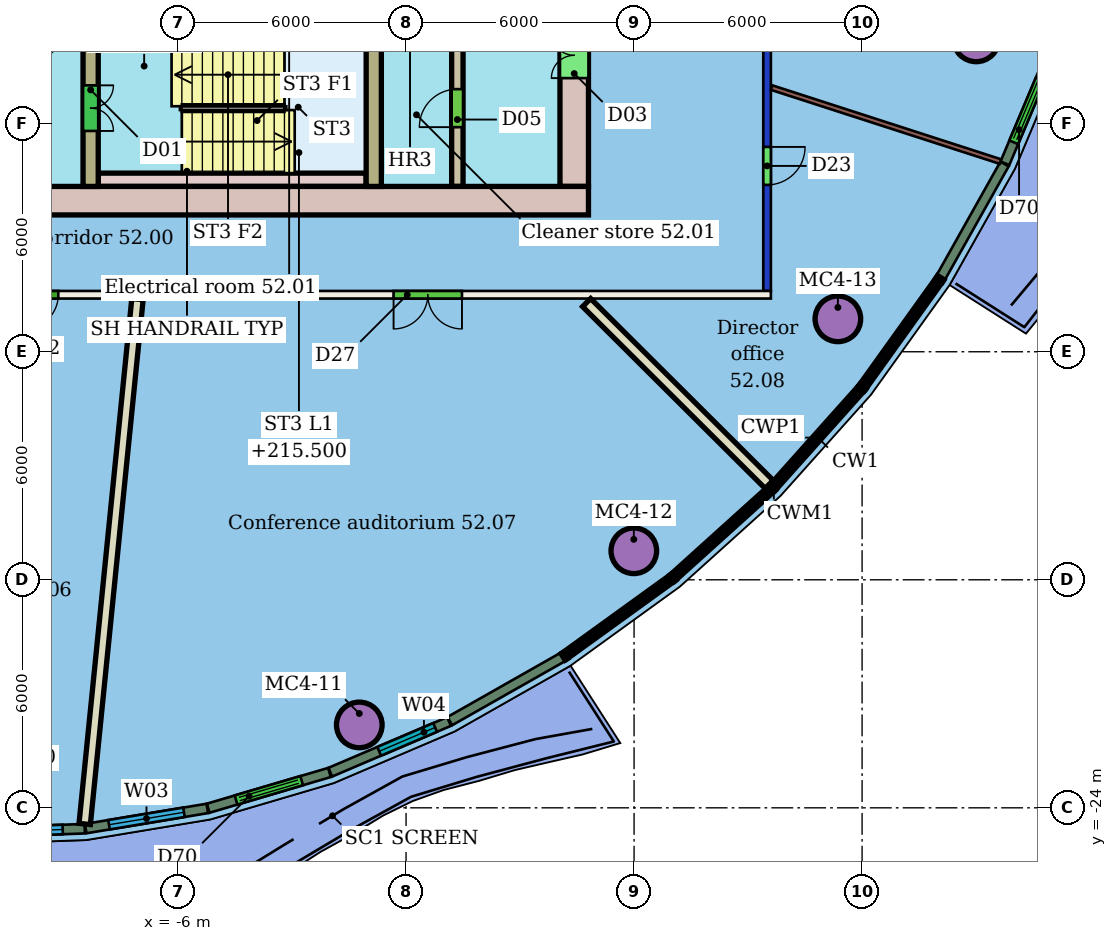
"""IFC4 building model, lengths in metres.
Left out: names, types, materials, properties, quantities, classifications, styles, units other than length and angle.
Written with IfcOpenShell. Run it as: python <this file> out.ifc"""

import sys

from ifc_helpers import new_model, si_unit, direction, frame, frame_2d, origin, origin_2d, place, context, subcontext, project, spatial, rectangle, hollow_circle, extrude, element, fill, save


model = new_model("IFC4")
c1 = context("Model", 3, precision=1e-05, world=origin(), true_north=direction((0.0, 1.0)))
c2 = subcontext(c1, "Body", "Model", "MODEL_VIEW")
j1 = project(units=[si_unit("LENGTHUNIT", "METRE"), si_unit("PLANEANGLEUNIT", "RADIAN")], contexts=[c1])
p1 = place(None, origin())
s1 = spatial("IfcSite", under=j1, at=p1, CompositionType="ELEMENT")
p2 = place(p1, origin())
s2 = spatial("IfcBuilding", under=s1, at=p2, CompositionType="ELEMENT")
p3 = place(p2, frame((0.0, 0.0, 213.7)))
s3 = spatial("IfcBuildingStorey", under=s2, at=p3, CompositionType="ELEMENT", Elevation=213.7)
for number, where, z_axis, x_axis in (
    (1, (-1.231, -21.819, 0.0), (0.0, 0.0, 1.0), (1.0, 0.0, 0.0)),
    (2, (5.993, -17.237, 0.0), (0.0, 0.0, 1.0), (1.0, 0.0, 0.0)),
    (3, (11.363, -11.134, 0.0), (0.0, 0.0, 1.0), (1.0, 0.0, 0.0)),
    (4, (15.003, -3.768, 0.0), (0.0, 0.0, 1.0), (1.0, 0.0, 0.0)),
):
    element("IfcColumn", number, at=place(p3, frame(where, z_axis=z_axis, x_axis=x_axis)), inside=s3, PredefinedType="COLUMN", context=c2, shape_type="SweptSolid", body=[
        extrude(hollow_circle(Radius=0.6, WallThickness=0.045, at=origin_2d()), origin(), (0.0, 0.0, 1.0), 3.45),
    ])
p4 = place(p3, frame((9.6, -10.5, 0.0), z_axis=(0.0, 0.0, 1.0), x_axis=(-1.0, 0.0, 0.0)))
e5 = element("IfcWall", 5, at=p4, inside=s3, PredefinedType="PARTITIONING", context=c2, shape_type="SweptSolid", body=[
    extrude(rectangle(XDim=31.2, YDim=0.2, at=frame_2d((15.6, 0.0))), origin(), (0.0, 0.0, 1.0), 3.45),
])
p5 = place(p4, frame((21.715, 0.0, 0.0)))
e6 = element("IfcOpeningElement", 6, at=p5, cuts=e5, PredefinedType="OPENING", context=c2, shape_type="SweptSolid", body=[
    extrude(rectangle(XDim=0.9, YDim=2.1, at=frame_2d((0.45, 1.05))), frame((0.0, 0.11, 0.0), z_axis=(0.0, -1.0, 0.0), x_axis=(1.0, 0.0, 0.0)), (0.0, 0.0, 1.0), 0.22),
])
p6 = place(p4, frame((18.751, 0.0, 0.0)))
e7 = element("IfcOpeningElement", 7, at=p6, cuts=e5, PredefinedType="OPENING", context=c2, shape_type="SweptSolid", body=[
    extrude(rectangle(XDim=0.9, YDim=2.1, at=frame_2d((0.45, 1.05))), frame((0.0, 0.11, 0.0), z_axis=(0.0, -1.0, 0.0), x_axis=(1.0, 0.0, 0.0)), (0.0, 0.0, 1.0), 0.22),
])
p7 = place(p4, frame((8.129, 0.0, 0.0)))
e8 = element("IfcOpeningElement", 8, at=p7, cuts=e5, PredefinedType="OPENING", context=c2, shape_type="SweptSolid", body=[
    extrude(rectangle(XDim=1.8, YDim=2.4, at=frame_2d((0.9, 1.2))), frame((0.0, 0.11, 0.0), z_axis=(0.0, -1.0, 0.0), x_axis=(1.0, 0.0, 0.0)), (0.0, 0.0, 1.0), 0.22),
])
p8 = place(p3, frame((9.5, 10.4, 0.0), z_axis=(0.0, 0.0, 1.0), x_axis=(0.0, -1.0, 0.0)))
e9 = element("IfcWall", 9, at=p8, inside=s3, PredefinedType="PARTITIONING", context=c2, shape_type="SweptSolid", body=[
    extrude(rectangle(XDim=20.8, YDim=0.2, at=frame_2d((10.4, 0.0))), origin(), (0.0, 0.0, 1.0), 3.05),
])
p9 = place(p8, frame((17.01, 0.0, 0.0)))
e10 = element("IfcOpeningElement", 10, at=p9, cuts=e9, PredefinedType="OPENING", context=c2, shape_type="SweptSolid", body=[
    extrude(rectangle(XDim=1.0, YDim=2.4, at=frame_2d((0.5, 1.2))), frame((0.0, 0.11, 0.0), z_axis=(0.0, -1.0, 0.0), x_axis=(1.0, 0.0, 0.0)), (0.0, 0.0, 1.0), 0.22),
])
p10 = place(p8, frame((11.015, 0.0, 0.0)))
e11 = element("IfcOpeningElement", 11, at=p10, cuts=e9, PredefinedType="OPENING", context=c2, shape_type="SweptSolid", body=[
    extrude(rectangle(XDim=1.5, YDim=2.1, at=frame_2d((0.75, 1.05))), frame((0.0, 0.11, 0.0), z_axis=(0.0, -1.0, 0.0), x_axis=(1.0, 0.0, 0.0)), (0.0, 0.0, 1.0), 0.22),
])
p11 = place(p3, frame((-8.456, -24.425, 0.0), z_axis=(0.0, 0.0, 1.0), x_axis=(0.100052305019, 0.994982178866, 0.0)))
e12 = element("IfcWall", 12, at=p11, inside=s3, PredefinedType="PARTITIONING", context=c2, shape_type="SweptSolid", body=[
    extrude(rectangle(XDim=13.879, YDim=0.3, at=frame_2d((6.94, 0.0))), origin(), (0.0, 0.0, 1.0), 3.45),
])
p12 = place(p3, frame((9.555, -15.49, 0.0), z_axis=(0.0, 0.0, 1.0), x_axis=(-0.708581751717, 0.705628727543, 0.0)))
e13 = element("IfcWall", 13, at=p12, inside=s3, PredefinedType="PARTITIONING", context=c2, shape_type="SweptSolid", body=[
    extrude(rectangle(XDim=6.779, YDim=0.3, at=frame_2d((3.39, 0.0))), origin(), (0.0, 0.0, 1.0), 3.45),
])
p13 = place(p3, frame((15.642, -6.996, 0.0), z_axis=(0.0, 0.0, 1.0), x_axis=(-0.951521574536, 0.307582010514, 0.0)))
e14 = element("IfcWall", 14, at=p13, inside=s3, PredefinedType="PARTITIONING", context=c2, shape_type="SweptSolid", body=[
    extrude(rectangle(XDim=6.329, YDim=0.125, at=frame_2d((3.165, 0.0))), origin(), (0.0, 0.0, 1.0), 3.45),
])
p14 = place(p3, frame((-11.613, -24.663, 0.0), z_axis=(0.0, 0.0, 1.0), x_axis=(0.999351383862, 0.036011270096, 0.0)))
e15 = element("IfcWall", 15, at=p14, inside=s3, PredefinedType="SOLIDWALL", context=c2, shape_type="SweptSolid", body=[
    extrude(rectangle(XDim=3.159, YDim=0.25, at=frame_2d((1.58, 0.0))), origin(), (0.0, 0.0, 1.0), 3.1),
])
p15 = place(p14, frame((0.58, 0.0, 0.9)))
e16 = element("IfcOpeningElement", 16, at=p15, cuts=e15, PredefinedType="OPENING", context=c2, shape_type="SweptSolid", body=[
    extrude(rectangle(XDim=2.0, YDim=2.1, at=frame_2d((1.0, 1.05))), frame((0.0, 0.135, 0.0), z_axis=(0.0, -1.0, 0.0), x_axis=(1.0, 0.0, 0.0)), (0.0, 0.0, 1.0), 0.27),
])
p16 = place(p3, frame((-8.432, -24.547, 0.0), z_axis=(0.0, 0.0, 1.0), x_axis=(0.986515622096, 0.163667123641, 0.0)))
e17 = element("IfcWall", 17, at=p16, inside=s3, PredefinedType="SOLIDWALL", context=c2, shape_type="SweptSolid", body=[
    extrude(rectangle(XDim=3.246, YDim=0.25, at=frame_2d((1.623, 0.0))), origin(), (0.0, 0.0, 1.0), 3.1),
])
p17 = place(p16, frame((0.623, 0.0, 0.9)))
e18 = element("IfcOpeningElement", 18, at=p17, cuts=e17, PredefinedType="OPENING", context=c2, shape_type="SweptSolid", body=[
    extrude(rectangle(XDim=2.0, YDim=2.1, at=frame_2d((1.0, 1.05))), frame((0.0, 0.135, 0.0), z_axis=(0.0, -1.0, 0.0), x_axis=(1.0, 0.0, 0.0)), (0.0, 0.0, 1.0), 0.27),
])
p18 = place(p3, frame((-5.207, -24.011, 0.0), z_axis=(0.0, 0.0, 1.0), x_axis=(0.959226347216, 0.282639018548, 0.0)))
e19 = element("IfcWall", 19, at=p18, inside=s3, PredefinedType="SOLIDWALL", context=c2, shape_type="SweptSolid", body=[
    extrude(rectangle(XDim=3.327, YDim=0.25, at=frame_2d((1.664, 0.0))), origin(), (0.0, 0.0, 1.0), 3.1),
])
p19 = place(p18, frame((0.764, 0.0, 0.0)))
e20 = element("IfcOpeningElement", 20, at=p19, cuts=e19, PredefinedType="OPENING", context=c2, shape_type="SweptSolid", body=[
    extrude(rectangle(XDim=1.8, YDim=2.4, at=frame_2d((0.9, 1.2))), frame((0.0, 0.135, 0.0), z_axis=(0.0, -1.0, 0.0), x_axis=(1.0, 0.0, 0.0)), (0.0, 0.0, 1.0), 0.27),
])
p20 = place(p3, frame((-1.994, -23.063, 0.0), z_axis=(0.0, 0.0, 1.0), x_axis=(0.919690332373, 0.392644486195, 0.0)))
e21 = element("IfcWall", 21, at=p20, inside=s3, PredefinedType="SOLIDWALL", context=c2, shape_type="SweptSolid", body=[
    extrude(rectangle(XDim=3.399, YDim=0.25, at=frame_2d((1.699, 0.0))), origin(), (0.0, 0.0, 1.0), 3.1),
])
p21 = place(p20, frame((1.399, 0.0, 0.9)))
e22 = element("IfcOpeningElement", 22, at=p21, cuts=e21, PredefinedType="OPENING", context=c2, shape_type="SweptSolid", body=[
    extrude(rectangle(XDim=1.6, YDim=2.1, at=frame_2d((0.8, 1.05))), frame((0.0, 0.135, 0.0), z_axis=(0.0, -1.0, 0.0), x_axis=(1.0, 0.0, 0.0)), (0.0, 0.0, 1.0), 0.27),
])
for number, where, z_axis, x_axis in (
    (23, (1.152, -21.719, 0.0), (0.0, 0.0, 1.0), (0.87, 0.494, 0.0)),
    (24, (14.077, -10.035, 0.0), (0.0, 0.0, 1.0), (0.49, 0.872, 0.0)),
):
    element("IfcWall", number, at=place(p3, frame(where, z_axis=z_axis, x_axis=x_axis)), inside=s3, PredefinedType="SOLIDWALL", context=c2, shape_type="SweptSolid", body=[
        extrude(rectangle(XDim=3.412, YDim=0.25, at=frame_2d((1.706, 0.0))), origin(), (0.0, 0.0, 1.0), 3.1),
    ])
p22 = place(p3, frame((15.758, -7.041, 0.0), z_axis=(0.0, 0.0, 1.0), x_axis=(0.388763390527, 0.921337628769, 0.0)))
e25 = element("IfcWall", 25, at=p22, inside=s3, PredefinedType="SOLIDWALL", context=c2, shape_type="SweptSolid", body=[
    extrude(rectangle(XDim=3.399, YDim=0.25, at=frame_2d((1.699, 0.0))), origin(), (0.0, 0.0, 1.0), 3.1),
])
p23 = place(p22, frame((0.599, 0.0, 0.0)))
e26 = element("IfcOpeningElement", 26, at=p23, cuts=e25, PredefinedType="OPENING", context=c2, shape_type="SweptSolid", body=[
    extrude(rectangle(XDim=1.8, YDim=2.4, at=frame_2d((0.9, 1.2))), frame((0.0, 0.135, 0.0), z_axis=(0.0, -1.0, 0.0), x_axis=(1.0, 0.0, 0.0)), (0.0, 0.0, 1.0), 0.27),
])
p24 = place(p3, frame((-16.8, -8.025, 0.0), z_axis=(0.0, 0.0, 1.0), x_axis=(1.0, 0.0, 0.0)))
e27 = element("IfcWall", 27, at=p24, inside=s3, PredefinedType="SHEAR", context=c2, shape_type="SweptSolid", body=[
    extrude(rectangle(XDim=21.6, YDim=0.75, at=frame_2d((10.8, 0.0))), origin(), (0.0, 0.0, 1.0), 3.3),
])
p25 = place(p24, frame((4.8, 0.0, 0.0)))
e28 = element("IfcOpeningElement", 28, at=p25, cuts=e27, PredefinedType="OPENING", context=c2, shape_type="SweptSolid", body=[
    extrude(rectangle(XDim=1.2, YDim=2.1, at=frame_2d((0.6, 1.05))), frame((0.0, 0.385, 0.0), z_axis=(0.0, -1.0, 0.0), x_axis=(1.0, 0.0, 0.0)), (0.0, 0.0, 1.0), 0.77),
])
p26 = place(p3, frame((4.425, -7.65, 0.0), z_axis=(0.0, 0.0, 1.0), x_axis=(0.0, 1.0, 0.0)))
e29 = element("IfcWall", 29, at=p26, inside=s3, PredefinedType="SHEAR", context=c2, shape_type="SweptSolid", body=[
    extrude(rectangle(XDim=15.3, YDim=0.75, at=frame_2d((7.65, 0.0))), origin(), (0.0, 0.0, 1.0), 3.3),
])
p27 = place(p26, frame((2.85, 0.0, 0.0)))
e30 = element("IfcOpeningElement", 30, at=p27, cuts=e29, PredefinedType="OPENING", context=c2, shape_type="SweptSolid", body=[
    extrude(rectangle(XDim=1.2, YDim=2.1, at=frame_2d((0.6, 1.05))), frame((0.0, 0.385, 0.0), z_axis=(0.0, -1.0, 0.0), x_axis=(1.0, 0.0, 0.0)), (0.0, 0.0, 1.0), 0.77),
])
p28 = place(p26, frame((11.25, 0.0, 0.0)))
e31 = element("IfcOpeningElement", 31, at=p28, cuts=e29, PredefinedType="OPENING", context=c2, shape_type="SweptSolid", body=[
    extrude(rectangle(XDim=1.2, YDim=2.1, at=frame_2d((0.6, 1.05))), frame((0.0, 0.385, 0.0), z_axis=(0.0, -1.0, 0.0), x_axis=(1.0, 0.0, 0.0)), (0.0, 0.0, 1.0), 0.77),
])
p29 = place(p3, frame((1.35, -7.65, 0.0), z_axis=(0.0, 0.0, 1.0), x_axis=(0.0, 1.0, 0.0)))
e32 = element("IfcWall", 32, at=p29, inside=s3, PredefinedType="SHEAR", context=c2, shape_type="SweptSolid", body=[
    extrude(rectangle(XDim=15.3, YDim=0.3, at=frame_2d((7.65, 0.0))), origin(), (0.0, 0.0, 1.0), 3.3),
])
p30 = place(p29, frame((1.56, 0.0, 0.0)))
e33 = element("IfcOpeningElement", 33, at=p30, cuts=e32, PredefinedType="OPENING", context=c2, shape_type="SweptSolid", body=[
    extrude(rectangle(XDim=1.0, YDim=2.1, at=frame_2d((0.5, 1.05))), frame((0.0, 0.16, 0.0), z_axis=(0.0, -1.0, 0.0), x_axis=(1.0, 0.0, 0.0)), (0.0, 0.0, 1.0), 0.32),
])
p31 = place(p29, frame((6.9, 0.0, 0.0)))
e34 = element("IfcOpeningElement", 34, at=p31, cuts=e32, PredefinedType="OPENING", context=c2, shape_type="SweptSolid", body=[
    extrude(rectangle(XDim=1.5, YDim=2.1, at=frame_2d((0.75, 1.05))), frame((0.0, 0.16, 0.0), z_axis=(0.0, -1.0, 0.0), x_axis=(1.0, 0.0, 0.0)), (0.0, 0.0, 1.0), 0.32),
])
p32 = place(p3, frame((-8.3, -3.88, 0.0), z_axis=(0.0, 0.0, 1.0), x_axis=(0.0, -1.0, 0.0)))
e35 = element("IfcWall", 35, at=p32, inside=s3, PredefinedType="SHEAR", context=c2, shape_type="SweptSolid", body=[
    extrude(rectangle(XDim=3.77, YDim=0.4, at=frame_2d((1.885, 0.0))), origin(), (0.0, 0.0, 1.0), 3.3),
])
p33 = place(p32, frame((1.11, 0.0, 0.0)))
e36 = element("IfcOpeningElement", 36, at=p33, cuts=e35, PredefinedType="OPENING", context=c2, shape_type="SweptSolid", body=[
    extrude(rectangle(XDim=1.2, YDim=2.1, at=frame_2d((0.6, 1.05))), frame((0.0, 0.21, 0.0), z_axis=(0.0, -1.0, 0.0), x_axis=(1.0, 0.0, 0.0)), (0.0, 0.0, 1.0), 0.42),
])
p34 = place(p3, frame((-0.85, -3.88, 0.0), z_axis=(0.0, 0.0, 1.0), x_axis=(0.0, -1.0, 0.0)))
e37 = element("IfcWall", 37, at=p34, inside=s3, PredefinedType="SHEAR", context=c2, shape_type="SweptSolid", body=[
    extrude(rectangle(XDim=3.77, YDim=0.4, at=frame_2d((1.885, 0.0))), origin(), (0.0, 0.0, 1.0), 3.3),
])
p35 = place(p3, frame((-8.1, -7.475, 0.0), z_axis=(0.0, 0.0, 1.0), x_axis=(1.0, 0.0, 0.0)))
e38 = element("IfcWall", 38, at=p35, inside=s3, PredefinedType="SHEAR", context=c2, shape_type="SweptSolid", body=[
    extrude(rectangle(XDim=7.05, YDim=0.35, at=frame_2d((3.525, 0.0))), origin(), (0.0, 0.0, 1.0), 3.3),
])
p36 = place(p6, origin())
e39 = element("IfcDoor", 39, at=p36, inside=s3, OperationType="SINGLE_SWING_RIGHT", PredefinedType="DOOR", context=c2, shape_type="SweptSolid", body=[
    extrude(rectangle(XDim=0.9, YDim=2.1, at=frame_2d((0.45, 1.05))), frame((0.0, 0.025, 0.0), z_axis=(0.0, -1.0, 0.0), x_axis=(1.0, 0.0, 0.0)), (0.0, 0.0, 1.0), 0.05),
])
fill(e7, e39)
p37 = place(p7, origin())
e40 = element("IfcDoor", 40, at=p37, inside=s3, OperationType="DOUBLE_DOOR_SINGLE_SWING", PredefinedType="DOOR", context=c2, shape_type="SweptSolid", body=[
    extrude(rectangle(XDim=1.8, YDim=2.4, at=frame_2d((0.9, 1.2))), frame((0.0, 0.025, 0.0), z_axis=(0.0, -1.0, 0.0), x_axis=(1.0, 0.0, 0.0)), (0.0, 0.0, 1.0), 0.05),
])
fill(e8, e40)
p38 = place(p9, origin())
e41 = element("IfcDoor", 41, at=p38, inside=s3, OperationType="SINGLE_SWING_LEFT", PredefinedType="DOOR", context=c2, shape_type="SweptSolid", body=[
    extrude(rectangle(XDim=1.0, YDim=2.4, at=frame_2d((0.5, 1.2))), frame((0.0, 0.025, 0.0), z_axis=(0.0, -1.0, 0.0), x_axis=(1.0, 0.0, 0.0)), (0.0, 0.0, 1.0), 0.05),
])
fill(e10, e41)
p39 = place(p15, origin())
e42 = element("IfcWindow", 42, at=p39, inside=s3, PartitioningType="SINGLE_PANEL", PredefinedType="WINDOW", context=c2, shape_type="SweptSolid", body=[
    extrude(rectangle(XDim=2.0, YDim=2.1, at=frame_2d((1.0, 1.05))), frame((0.0, 0.03, 0.0), z_axis=(0.0, -1.0, 0.0), x_axis=(1.0, 0.0, 0.0)), (0.0, 0.0, 1.0), 0.06),
])
fill(e16, e42)
p40 = place(p17, origin())
e43 = element("IfcWindow", 43, at=p40, inside=s3, PartitioningType="SINGLE_PANEL", PredefinedType="WINDOW", context=c2, shape_type="SweptSolid", body=[
    extrude(rectangle(XDim=2.0, YDim=2.1, at=frame_2d((1.0, 1.05))), frame((0.0, 0.03, 0.0), z_axis=(0.0, -1.0, 0.0), x_axis=(1.0, 0.0, 0.0)), (0.0, 0.0, 1.0), 0.06),
])
fill(e18, e43)
p41 = place(p19, origin())
e44 = element("IfcDoor", 44, at=p41, inside=s3, OperationType="DOUBLE_DOOR_SLIDING", PredefinedType="DOOR", context=c2, shape_type="SweptSolid", body=[
    extrude(rectangle(XDim=1.8, YDim=2.4, at=frame_2d((0.9, 1.2))), frame((0.0, 0.025, 0.0), z_axis=(0.0, -1.0, 0.0), x_axis=(1.0, 0.0, 0.0)), (0.0, 0.0, 1.0), 0.05),
])
fill(e20, e44)
p42 = place(p21, origin())
e45 = element("IfcWindow", 45, at=p42, inside=s3, PartitioningType="SINGLE_PANEL", PredefinedType="WINDOW", context=c2, shape_type="SweptSolid", body=[
    extrude(rectangle(XDim=1.6, YDim=2.1, at=frame_2d((0.8, 1.05))), frame((0.0, 0.03, 0.0), z_axis=(0.0, -1.0, 0.0), x_axis=(1.0, 0.0, 0.0)), (0.0, 0.0, 1.0), 0.06),
])
fill(e22, e45)
p43 = place(p23, origin())
e46 = element("IfcDoor", 46, at=p43, inside=s3, OperationType="DOUBLE_DOOR_SLIDING", PredefinedType="DOOR", context=c2, shape_type="SweptSolid", body=[
    extrude(rectangle(XDim=1.8, YDim=2.4, at=frame_2d((0.9, 1.2))), frame((0.0, 0.025, 0.0), z_axis=(0.0, -1.0, 0.0), x_axis=(1.0, 0.0, 0.0)), (0.0, 0.0, 1.0), 0.05),
])
fill(e26, e46)
p44 = place(p27, origin())
e47 = element("IfcDoor", 47, at=p44, inside=s3, OperationType="DOUBLE_DOOR_SINGLE_SWING", PredefinedType="NOTDEFINED", context=c2, shape_type="SweptSolid", body=[
    extrude(rectangle(XDim=1.2, YDim=2.1, at=frame_2d((0.6, 1.05))), frame((0.0, 0.025, 0.0), z_axis=(0.0, -1.0, 0.0), x_axis=(1.0, 0.0, 0.0)), (0.0, 0.0, 1.0), 0.05),
])
fill(e30, e47)
p45 = place(p30, origin())
e48 = element("IfcDoor", 48, at=p45, inside=s3, OperationType="SINGLE_SWING_LEFT", PredefinedType="NOTDEFINED", context=c2, shape_type="SweptSolid", body=[
    extrude(rectangle(XDim=1.0, YDim=2.1, at=frame_2d((0.5, 1.05))), frame((0.0, 0.025, 0.0), z_axis=(0.0, -1.0, 0.0), x_axis=(1.0, 0.0, 0.0)), (0.0, 0.0, 1.0), 0.05),
])
fill(e33, e48)
p46 = place(p33, origin())
e49 = element("IfcDoor", 49, at=p46, inside=s3, OperationType="DOUBLE_DOOR_SINGLE_SWING", PredefinedType="NOTDEFINED", context=c2, shape_type="SweptSolid", body=[
    extrude(rectangle(XDim=1.2, YDim=2.1, at=frame_2d((0.6, 1.05))), frame((0.0, 0.025, 0.0), z_axis=(0.0, -1.0, 0.0), x_axis=(1.0, 0.0, 0.0)), (0.0, 0.0, 1.0), 0.05),
])
fill(e36, e49)
save(model, sys.argv[1])
